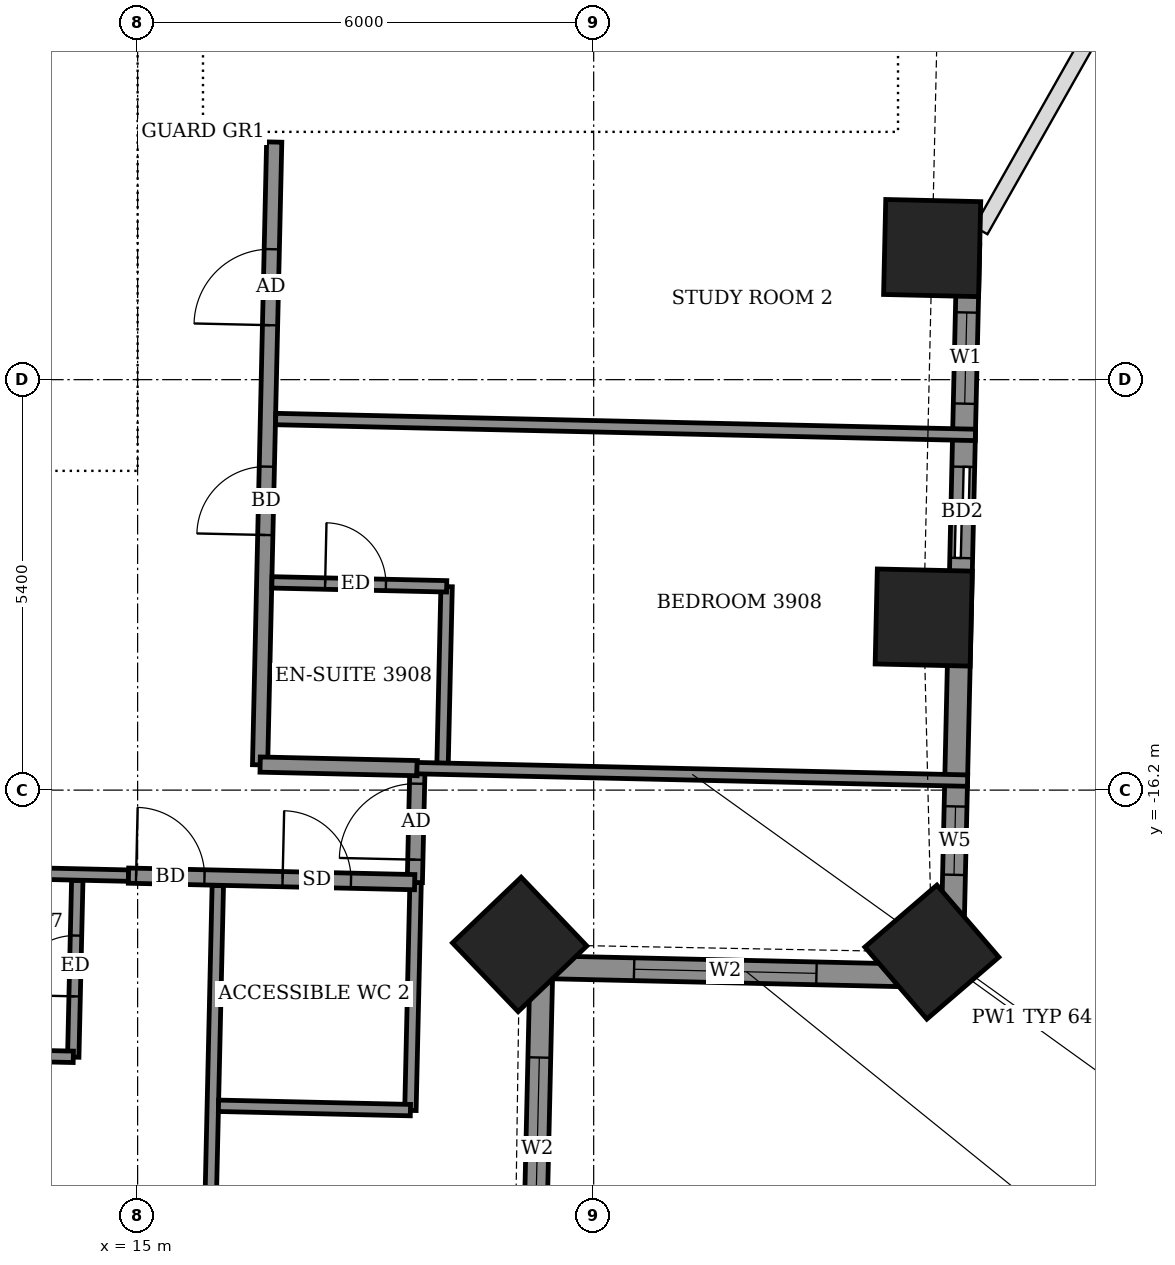
"""IFC4 building model, lengths in metres.
Left out: names, types, materials, properties, quantities, classifications, styles, units other than length and angle.
Written with IfcOpenShell. Run it as: python <this file> out.ifc"""

import sys

from ifc_helpers import new_model, si_unit, direction, frame, frame_2d, origin, origin_2d, place, context, subcontext, project, spatial, rectangle, extrude, element, fill, save


model = new_model("IFC4")
c1 = context("Model", 3, precision=1e-05, world=origin(), true_north=direction((0.0, 1.0)))
c2 = subcontext(c1, "Body", "Model", "MODEL_VIEW")
j1 = project(units=[si_unit("LENGTHUNIT", "METRE"), si_unit("PLANEANGLEUNIT", "RADIAN")], contexts=[c1])
p1 = place(None, origin())
s1 = spatial("IfcSite", under=j1, at=p1, CompositionType="ELEMENT")
p2 = place(p1, origin())
s2 = spatial("IfcBuilding", under=s1, at=p2, CompositionType="ELEMENT")
p3 = place(p2, frame((0.0, 0.0, 156.3)))
s3 = spatial("IfcBuildingStorey", under=s2, at=p3, CompositionType="ELEMENT", Elevation=156.3)
for number, where, z_axis, x_axis in (
    (1, (20.026, -18.23, -0.55), (0.0, 0.0, 1.0), (0.723, 0.691, 0.0)),
    (2, (25.449, -18.331, -0.55), (0.0, 0.0, 1.0), (0.758, 0.652, 0.0)),
    (3, (25.342, -13.93, -0.55), (0.0, 0.0, 1.0), (0.023, 1.0, 0.0)),
    (4, (25.453, -9.069, -0.55), (0.0, 0.0, 1.0), (0.023, 1.0, 0.0)),
):
    element("IfcColumn", number, at=place(p3, frame(where, z_axis=z_axis, x_axis=x_axis)), inside=s3, PredefinedType="COLUMN", context=c2, shape_type="SweptSolid", body=[
        extrude(rectangle(XDim=1.25, YDim=1.25, at=origin_2d()), origin(), (0.0, 0.0, 1.0), 3.6),
    ])
p4 = place(p3, frame((25.71, -18.651, 0.0), z_axis=(0.0, 0.0, 1.0), x_axis=(0.02274444447, 0.999741311663, 0.0)))
e5 = element("IfcWall", 5, at=p4, inside=s3, PredefinedType="SOLIDWALL", context=c2, shape_type="SweptSolid", body=[
    extrude(rectangle(XDim=9.628, YDim=0.3, at=frame_2d((4.814, 0.0))), origin(), (0.0, 0.0, 1.0), 2.55),
])
p5 = place(p4, frame((1.337, 0.0, 0.9)))
e6 = element("IfcOpeningElement", 6, at=p5, cuts=e5, PredefinedType="OPENING", context=c2, shape_type="SweptSolid", body=[
    extrude(rectangle(XDim=0.9, YDim=1.5, at=frame_2d((0.45, 0.75))), frame((0.0, 0.16, 0.0), z_axis=(0.0, -1.0, 0.0), x_axis=(1.0, 0.0, 0.0)), (0.0, 0.0, 1.0), 0.32),
])
p6 = place(p4, frame((5.506, 0.0, 0.0)))
e7 = element("IfcOpeningElement", 7, at=p6, cuts=e5, PredefinedType="OPENING", context=c2, shape_type="SweptSolid", body=[
    extrude(rectangle(XDim=1.2, YDim=2.4, at=frame_2d((0.6, 1.2))), frame((0.0, 0.16, 0.0), z_axis=(0.0, -1.0, 0.0), x_axis=(1.0, 0.0, 0.0)), (0.0, 0.0, 1.0), 0.32),
])
p7 = place(p4, frame((7.537, 0.0, 0.9)))
e8 = element("IfcOpeningElement", 8, at=p7, cuts=e5, PredefinedType="OPENING", context=c2, shape_type="SweptSolid", body=[
    extrude(rectangle(XDim=1.2, YDim=1.5, at=frame_2d((0.6, 0.75))), frame((0.0, 0.16, 0.0), z_axis=(0.0, -1.0, 0.0), x_axis=(1.0, 0.0, 0.0)), (0.0, 0.0, 1.0), 0.32),
])
p8 = place(p3, frame((20.189, -23.927, 0.0), z_axis=(0.0, 0.0, 1.0), x_axis=(0.022789195272, 0.999740292565, 0.0)))
e9 = element("IfcWall", 9, at=p8, inside=s3, PredefinedType="SOLIDWALL", context=c2, shape_type="SweptSolid", body=[
    extrude(rectangle(XDim=5.399, YDim=0.3, at=frame_2d((2.7, 0.0))), origin(), (0.0, 0.0, 1.0), 2.55),
])
p9 = place(p8, frame((1.81, 0.0, 0.9)))
e10 = element("IfcOpeningElement", 10, at=p9, cuts=e9, PredefinedType="OPENING", context=c2, shape_type="SweptSolid", body=[
    extrude(rectangle(XDim=2.4, YDim=1.5, at=frame_2d((1.2, 0.75))), frame((0.0, 0.16, 0.0), z_axis=(0.0, -1.0, 0.0), x_axis=(1.0, 0.0, 0.0)), (0.0, 0.0, 1.0), 0.32),
])
p10 = place(p3, frame((20.312, -18.529, 0.0), z_axis=(0.0, 0.0, 1.0), x_axis=(0.999745417973, -0.02256322766, 0.0)))
e11 = element("IfcWall", 11, at=p10, inside=s3, PredefinedType="SOLIDWALL", context=c2, shape_type="SweptSolid", body=[
    extrude(rectangle(XDim=5.399, YDim=0.3, at=frame_2d((2.7, 0.0))), origin(), (0.0, 0.0, 1.0), 2.55),
])
p11 = place(p10, frame((1.22, 0.0, 0.9)))
e12 = element("IfcOpeningElement", 12, at=p11, cuts=e11, PredefinedType="OPENING", context=c2, shape_type="SweptSolid", body=[
    extrude(rectangle(XDim=2.4, YDim=1.5, at=frame_2d((1.2, 0.75))), frame((0.0, 0.16, 0.0), z_axis=(0.0, -1.0, 0.0), x_axis=(1.0, 0.0, 0.0)), (0.0, 0.0, 1.0), 0.32),
])
p12 = place(p3, frame((15.907, -23.98, 0.0), z_axis=(0.0, 0.0, 1.0), x_axis=(0.022672114006, 0.999742954587, 0.0)))
e13 = element("IfcWall", 13, at=p12, inside=s3, PredefinedType="PARTITIONING", context=c2, shape_type="SweptSolid", body=[
    extrude(rectangle(XDim=6.526, YDim=0.15, at=frame_2d((3.263, 0.0))), origin(), (0.0, 0.0, 1.0), 2.55),
])
p13 = place(p3, frame((18.589, -20.414, 0.0), z_axis=(0.0, 0.0, 1.0), x_axis=(0.022625271604, 0.999744015778, 0.0)))
e14 = element("IfcWall", 14, at=p13, inside=s3, PredefinedType="PARTITIONING", context=c2, shape_type="SweptSolid", body=[
    extrude(rectangle(XDim=3.0, YDim=0.15, at=frame_2d((1.5, 0.0))), origin(), (0.0, 0.0, 1.0), 3.05),
])
p14 = place(p3, frame((16.064, -20.353, 0.0), z_axis=(0.0, 0.0, 1.0), x_axis=(0.999746356616, -0.022521599255, 0.0)))
e15 = element("IfcWall", 15, at=p14, inside=s3, PredefinedType="PARTITIONING", context=c2, shape_type="SweptSolid", body=[
    extrude(rectangle(XDim=2.526, YDim=0.15, at=frame_2d((1.263, 0.0))), origin(), (0.0, 0.0, 1.0), 3.05),
])
p15 = place(p3, frame((14.153, -19.713, 0.0), z_axis=(0.0, 0.0, 1.0), x_axis=(0.02279059109, 0.999740260747, 0.0)))
e16 = element("IfcWall", 16, at=p15, inside=s3, PredefinedType="PARTITIONING", context=c2, shape_type="SweptSolid", body=[
    extrude(rectangle(XDim=2.324, YDim=0.15, at=frame_2d((1.162, 0.0))), origin(), (0.0, 0.0, 1.0), 3.05),
])
p16 = place(p15, frame((0.8, 0.0, 0.0)))
e17 = element("IfcOpeningElement", 17, at=p16, cuts=e16, PredefinedType="OPENING", context=c2, shape_type="SweptSolid", body=[
    extrude(rectangle(XDim=0.8, YDim=2.1, at=frame_2d((0.4, 1.05))), frame((0.0, 0.085, 0.0), z_axis=(0.0, -1.0, 0.0), x_axis=(1.0, 0.0, 0.0)), (0.0, 0.0, 1.0), 0.17),
])
p17 = place(p3, frame((9.355, -19.601, 0.0), z_axis=(0.0, 0.0, 1.0), x_axis=(0.999747294078, -0.022479946278, 0.0)))
e18 = element("IfcWall", 18, at=p17, inside=s3, PredefinedType="PARTITIONING", context=c2, shape_type="SweptSolid", body=[
    extrude(rectangle(XDim=4.8, YDim=0.15, at=frame_2d((2.4, 0.0))), origin(), (0.0, 0.0, 1.0), 3.05),
])
p18 = place(p3, frame((18.647, -17.415, 0.0), z_axis=(0.0, 0.0, 1.0), x_axis=(0.022617910375, 0.999744182344, 0.0)))
e19 = element("IfcWall", 19, at=p18, inside=s3, PredefinedType="PARTITIONING", context=c2, shape_type="SweptSolid", body=[
    extrude(rectangle(XDim=1.5, YDim=0.2, at=frame_2d((0.75, 0.0))), origin(), (0.0, 0.0, 1.0), 3.05),
])
p19 = place(p18, frame((0.3, 0.0, 0.0)))
e20 = element("IfcOpeningElement", 20, at=p19, cuts=e19, PredefinedType="OPENING", context=c2, shape_type="SweptSolid", body=[
    extrude(rectangle(XDim=1.0, YDim=2.1, at=frame_2d((0.5, 1.05))), frame((0.0, 0.11, 0.0), z_axis=(0.0, -1.0, 0.0), x_axis=(1.0, 0.0, 0.0)), (0.0, 0.0, 1.0), 0.22),
])
p20 = place(p3, frame((-15.649, -16.633, 0.0), z_axis=(0.0, 0.0, 1.0), x_axis=(0.999743261737, -0.022658565952, 0.0)))
e21 = element("IfcWall", 21, at=p20, inside=s3, PredefinedType="PARTITIONING", context=c2, shape_type="SweptSolid", body=[
    extrude(rectangle(XDim=30.536, YDim=0.15, at=frame_2d((15.268, 0.0))), origin(), (0.0, 0.0, 1.0), 3.05),
])
p21 = place(p20, frame((0.2, 0.0, 0.0)))
e22 = element("IfcOpeningElement", 22, at=p21, cuts=e21, PredefinedType="OPENING", context=c2, shape_type="SweptSolid", body=[
    extrude(rectangle(XDim=0.9, YDim=2.1, at=frame_2d((0.45, 1.05))), frame((0.0, 0.085, 0.0), z_axis=(0.0, -1.0, 0.0), x_axis=(1.0, 0.0, 0.0)), (0.0, 0.0, 1.0), 0.17),
])
p22 = place(p20, frame((4.465, 0.0, 0.0)))
e23 = element("IfcOpeningElement", 23, at=p22, cuts=e21, PredefinedType="OPENING", context=c2, shape_type="SweptSolid", body=[
    extrude(rectangle(XDim=0.9, YDim=2.1, at=frame_2d((0.45, 1.05))), frame((0.0, 0.085, 0.0), z_axis=(0.0, -1.0, 0.0), x_axis=(1.0, 0.0, 0.0)), (0.0, 0.0, 1.0), 0.17),
])
p23 = place(p20, frame((6.315, 0.0, 0.0)))
e24 = element("IfcOpeningElement", 24, at=p23, cuts=e21, PredefinedType="OPENING", context=c2, shape_type="SweptSolid", body=[
    extrude(rectangle(XDim=0.9, YDim=2.1, at=frame_2d((0.45, 1.05))), frame((0.0, 0.085, 0.0), z_axis=(0.0, -1.0, 0.0), x_axis=(1.0, 0.0, 0.0)), (0.0, 0.0, 1.0), 0.17),
])
p24 = place(p20, frame((13.04, 0.0, 0.0)))
e25 = element("IfcOpeningElement", 25, at=p24, cuts=e21, PredefinedType="OPENING", context=c2, shape_type="SweptSolid", body=[
    extrude(rectangle(XDim=0.9, YDim=2.1, at=frame_2d((0.45, 1.05))), frame((0.0, 0.085, 0.0), z_axis=(0.0, -1.0, 0.0), x_axis=(1.0, 0.0, 0.0)), (0.0, 0.0, 1.0), 0.17),
])
p25 = place(p20, frame((15.015, 0.0, 0.0)))
e26 = element("IfcOpeningElement", 26, at=p25, cuts=e21, PredefinedType="OPENING", context=c2, shape_type="SweptSolid", body=[
    extrude(rectangle(XDim=0.9, YDim=2.1, at=frame_2d((0.45, 1.05))), frame((0.0, 0.085, 0.0), z_axis=(0.0, -1.0, 0.0), x_axis=(1.0, 0.0, 0.0)), (0.0, 0.0, 1.0), 0.17),
])
p26 = place(p20, frame((21.74, 0.0, 0.0)))
e27 = element("IfcOpeningElement", 27, at=p26, cuts=e21, PredefinedType="OPENING", context=c2, shape_type="SweptSolid", body=[
    extrude(rectangle(XDim=0.9, YDim=2.1, at=frame_2d((0.45, 1.05))), frame((0.0, 0.085, 0.0), z_axis=(0.0, -1.0, 0.0), x_axis=(1.0, 0.0, 0.0)), (0.0, 0.0, 1.0), 0.17),
])
p27 = place(p20, frame((23.665, 0.0, 0.0)))
e28 = element("IfcOpeningElement", 28, at=p27, cuts=e21, PredefinedType="OPENING", context=c2, shape_type="SweptSolid", body=[
    extrude(rectangle(XDim=0.9, YDim=2.1, at=frame_2d((0.45, 1.05))), frame((0.0, 0.085, 0.0), z_axis=(0.0, -1.0, 0.0), x_axis=(1.0, 0.0, 0.0)), (0.0, 0.0, 1.0), 0.17),
])
p28 = place(p3, frame((14.88, -17.325, 0.0), z_axis=(0.0, 0.0, 1.0), x_axis=(0.999739622, -0.022818593369, 0.0)))
e29 = element("IfcWall", 29, at=p28, inside=s3, PredefinedType="PARTITIONING", context=c2, shape_type="SweptSolid", body=[
    extrude(rectangle(XDim=3.766, YDim=0.2, at=frame_2d((1.883, 0.0))), origin(), (0.0, 0.0, 1.0), 3.05),
])
p29 = place(p28, frame((0.1, 0.0, 0.0)))
e30 = element("IfcOpeningElement", 30, at=p29, cuts=e29, PredefinedType="OPENING", context=c2, shape_type="SweptSolid", body=[
    extrude(rectangle(XDim=0.9, YDim=2.1, at=frame_2d((0.45, 1.05))), frame((0.0, 0.11, 0.0), z_axis=(0.0, -1.0, 0.0), x_axis=(1.0, 0.0, 0.0)), (0.0, 0.0, 1.0), 0.22),
])
p30 = place(p28, frame((2.028, 0.0, 0.0)))
e31 = element("IfcOpeningElement", 31, at=p30, cuts=e29, PredefinedType="OPENING", context=c2, shape_type="SweptSolid", body=[
    extrude(rectangle(XDim=0.9, YDim=2.1, at=frame_2d((0.45, 1.05))), frame((0.0, 0.11, 0.0), z_axis=(0.0, -1.0, 0.0), x_axis=(1.0, 0.0, 0.0)), (0.0, 0.0, 1.0), 0.22),
])
p31 = place(p3, frame((16.611, -15.868, 0.0), z_axis=(0.0, 0.0, 1.0), x_axis=(0.022698399288, 0.999742358145, 0.0)))
e32 = element("IfcWall", 32, at=p31, inside=s3, PredefinedType="PARTITIONING", context=c2, shape_type="SweptSolid", body=[
    extrude(rectangle(XDim=8.196, YDim=0.2, at=frame_2d((4.098, 0.0))), origin(), (0.0, 0.0, 1.0), 3.05),
])
p32 = place(p31, frame((3.025, 0.0, 0.0)))
e33 = element("IfcOpeningElement", 33, at=p32, cuts=e32, PredefinedType="OPENING", context=c2, shape_type="SweptSolid", body=[
    extrude(rectangle(XDim=0.9, YDim=2.1, at=frame_2d((0.45, 1.05))), frame((0.0, 0.11, 0.0), z_axis=(0.0, -1.0, 0.0), x_axis=(1.0, 0.0, 0.0)), (0.0, 0.0, 1.0), 0.22),
])
p33 = place(p31, frame((5.786, 0.0, 0.0)))
e34 = element("IfcOpeningElement", 34, at=p33, cuts=e32, PredefinedType="OPENING", context=c2, shape_type="SweptSolid", body=[
    extrude(rectangle(XDim=1.0, YDim=2.1, at=frame_2d((0.5, 1.05))), frame((0.0, 0.11, 0.0), z_axis=(0.0, -1.0, 0.0), x_axis=(1.0, 0.0, 0.0)), (0.0, 0.0, 1.0), 0.22),
])
p34 = place(p3, frame((19.012, -15.848, 0.0), z_axis=(0.0, 0.0, 1.0), x_axis=(0.022781023197, 0.999740478815, 0.0)))
e35 = element("IfcWall", 35, at=p34, inside=s3, PredefinedType="PARTITIONING", context=c2, shape_type="SweptSolid", body=[
    extrude(rectangle(XDim=2.325, YDim=0.15, at=frame_2d((1.163, 0.0))), origin(), (0.0, 0.0, 1.0), 3.05),
])
p35 = place(p3, frame((16.612, -15.864, 0.0), z_axis=(0.0, 0.0, 1.0), x_axis=(0.999742931749, -0.02267312106, 0.0)))
e36 = element("IfcWall", 36, at=p35, inside=s3, PredefinedType="PARTITIONING", context=c2, shape_type="SweptSolid", body=[
    extrude(rectangle(XDim=2.067, YDim=0.2, at=frame_2d((1.034, 0.0))), origin(), (0.0, 0.0, 1.0), 3.05),
])
p36 = place(p3, frame((18.675, -15.911, 0.0), z_axis=(0.0, 0.0, 1.0), x_axis=(0.999743624132, -0.022642570706, 0.0)))
e37 = element("IfcWall", 37, at=p36, inside=s3, PredefinedType="PARTITIONING", context=c2, shape_type="SweptSolid", body=[
    extrude(rectangle(XDim=7.246, YDim=0.15, at=frame_2d((3.623, 0.0))), origin(), (0.0, 0.0, 1.0), 2.55),
])
p37 = place(p3, frame((16.767, -13.467, 0.0), z_axis=(0.0, 0.0, 1.0), x_axis=(0.999744241736, -0.022615284993, 0.0)))
e38 = element("IfcWall", 38, at=p37, inside=s3, PredefinedType="PARTITIONING", context=c2, shape_type="SweptSolid", body=[
    extrude(rectangle(XDim=2.299, YDim=0.15, at=frame_2d((1.15, 0.0))), origin(), (0.0, 0.0, 1.0), 3.05),
])
p38 = place(p37, frame((0.7, 0.0, 0.0)))
e39 = element("IfcOpeningElement", 39, at=p38, cuts=e38, PredefinedType="OPENING", context=c2, shape_type="SweptSolid", body=[
    extrude(rectangle(XDim=0.8, YDim=2.1, at=frame_2d((0.4, 1.05))), frame((0.0, 0.085, 0.0), z_axis=(0.0, -1.0, 0.0), x_axis=(1.0, 0.0, 0.0)), (0.0, 0.0, 1.0), 0.17),
])
p39 = place(p3, frame((16.816, -11.318, 0.0), z_axis=(0.0, 0.0, 1.0), x_axis=(0.999742437445, -0.022694906292, 0.0)))
e40 = element("IfcWall", 40, at=p39, inside=s3, PredefinedType="PARTITIONING", context=c2, shape_type="SweptSolid", body=[
    extrude(rectangle(XDim=9.208, YDim=0.15, at=frame_2d((4.604, 0.0))), origin(), (0.0, 0.0, 1.0), 2.55),
])
p40 = place(p3, frame((-14.7, -11.25, 0.0), z_axis=(0.0, 0.0, 1.0), x_axis=(1.0, 0.0, 0.0)))
e41 = element("IfcWall", 41, at=p40, inside=s3, PredefinedType="SHEAR", context=c2, shape_type="SweptSolid", body=[
    extrude(rectangle(XDim=29.4, YDim=0.9, at=frame_2d((14.7, 0.0))), origin(), (0.0, 0.0, 1.0), 3.6),
])
p41 = place(p3, frame((14.25, -10.8, 0.0), z_axis=(0.0, 0.0, 1.0), x_axis=(0.0, 1.0, 0.0)))
e42 = element("IfcWall", 42, at=p41, inside=s3, PredefinedType="SHEAR", context=c2, shape_type="SweptSolid", body=[
    extrude(rectangle(XDim=21.6, YDim=0.9, at=frame_2d((10.8, 0.0))), origin(), (0.0, 0.0, 1.0), 3.6),
])
p42 = place(p41, frame((1.2, 0.0, 0.0)))
e43 = element("IfcOpeningElement", 43, at=p42, cuts=e42, PredefinedType="OPENING", context=c2, shape_type="SweptSolid", body=[
    extrude(rectangle(XDim=1.2, YDim=2.1, at=frame_2d((0.6, 1.05))), frame((0.0, 0.46, 0.0), z_axis=(0.0, -1.0, 0.0), x_axis=(1.0, 0.0, 0.0)), (0.0, 0.0, 1.0), 0.92),
])
p43 = place(p5, origin())
e44 = element("IfcWindow", 44, at=p43, inside=s3, PartitioningType="SINGLE_PANEL", PredefinedType="WINDOW", context=c2, shape_type="SweptSolid", body=[
    extrude(rectangle(XDim=0.9, YDim=1.5, at=frame_2d((0.45, 0.75))), frame((0.0, 0.03, 0.0), z_axis=(0.0, -1.0, 0.0), x_axis=(1.0, 0.0, 0.0)), (0.0, 0.0, 1.0), 0.06),
])
fill(e6, e44)
p44 = place(p6, origin())
e45 = element("IfcDoor", 45, at=p44, inside=s3, OperationType="SLIDING_TO_LEFT", PredefinedType="DOOR", context=c2, shape_type="SweptSolid", body=[
    extrude(rectangle(XDim=1.2, YDim=2.4, at=frame_2d((0.6, 1.2))), frame((0.0, 0.025, 0.0), z_axis=(0.0, -1.0, 0.0), x_axis=(1.0, 0.0, 0.0)), (0.0, 0.0, 1.0), 0.05),
])
fill(e7, e45)
p45 = place(p7, origin())
e46 = element("IfcWindow", 46, at=p45, inside=s3, PartitioningType="SINGLE_PANEL", PredefinedType="WINDOW", context=c2, shape_type="SweptSolid", body=[
    extrude(rectangle(XDim=1.2, YDim=1.5, at=frame_2d((0.6, 0.75))), frame((0.0, 0.03, 0.0), z_axis=(0.0, -1.0, 0.0), x_axis=(1.0, 0.0, 0.0)), (0.0, 0.0, 1.0), 0.06),
])
fill(e8, e46)
p46 = place(p9, origin())
e47 = element("IfcWindow", 47, at=p46, inside=s3, PartitioningType="DOUBLE_PANEL_VERTICAL", PredefinedType="WINDOW", context=c2, shape_type="SweptSolid", body=[
    extrude(rectangle(XDim=2.4, YDim=1.5, at=frame_2d((1.2, 0.75))), frame((0.0, 0.03, 0.0), z_axis=(0.0, -1.0, 0.0), x_axis=(1.0, 0.0, 0.0)), (0.0, 0.0, 1.0), 0.06),
])
fill(e10, e47)
p47 = place(p11, origin())
e48 = element("IfcWindow", 48, at=p47, inside=s3, PartitioningType="DOUBLE_PANEL_VERTICAL", PredefinedType="WINDOW", context=c2, shape_type="SweptSolid", body=[
    extrude(rectangle(XDim=2.4, YDim=1.5, at=frame_2d((1.2, 0.75))), frame((0.0, 0.03, 0.0), z_axis=(0.0, -1.0, 0.0), x_axis=(1.0, 0.0, 0.0)), (0.0, 0.0, 1.0), 0.06),
])
fill(e12, e48)
p48 = place(p29, origin())
e49 = element("IfcDoor", 49, at=p48, inside=s3, OperationType="SINGLE_SWING_LEFT", PredefinedType="DOOR", context=c2, shape_type="SweptSolid", body=[
    extrude(rectangle(XDim=0.9, YDim=2.1, at=frame_2d((0.45, 1.05))), frame((0.0, 0.025, 0.0), z_axis=(0.0, -1.0, 0.0), x_axis=(1.0, 0.0, 0.0)), (0.0, 0.0, 1.0), 0.05),
])
fill(e30, e49)
p49 = place(p16, origin())
e50 = element("IfcDoor", 50, at=p49, inside=s3, OperationType="SINGLE_SWING_LEFT", PredefinedType="DOOR", context=c2, shape_type="SweptSolid", body=[
    extrude(rectangle(XDim=0.8, YDim=2.1, at=frame_2d((0.4, 1.05))), frame((0.0, 0.025, 0.0), z_axis=(0.0, -1.0, 0.0), x_axis=(1.0, 0.0, 0.0)), (0.0, 0.0, 1.0), 0.05),
])
fill(e17, e50)
p50 = place(p19, origin())
e51 = element("IfcDoor", 51, at=p50, inside=s3, OperationType="SINGLE_SWING_RIGHT", PredefinedType="DOOR", context=c2, shape_type="SweptSolid", body=[
    extrude(rectangle(XDim=1.0, YDim=2.1, at=frame_2d((0.5, 1.05))), frame((0.0, 0.025, 0.0), z_axis=(0.0, -1.0, 0.0), x_axis=(1.0, 0.0, 0.0)), (0.0, 0.0, 1.0), 0.05),
])
fill(e20, e51)
p51 = place(p30, origin())
e52 = element("IfcDoor", 52, at=p51, inside=s3, OperationType="SINGLE_SWING_RIGHT", PredefinedType="DOOR", context=c2, shape_type="SweptSolid", body=[
    extrude(rectangle(XDim=0.9, YDim=2.1, at=frame_2d((0.45, 1.05))), frame((0.0, 0.025, 0.0), z_axis=(0.0, -1.0, 0.0), x_axis=(1.0, 0.0, 0.0)), (0.0, 0.0, 1.0), 0.05),
])
fill(e31, e52)
p52 = place(p32, origin())
e53 = element("IfcDoor", 53, at=p52, inside=s3, OperationType="SINGLE_SWING_RIGHT", PredefinedType="DOOR", context=c2, shape_type="SweptSolid", body=[
    extrude(rectangle(XDim=0.9, YDim=2.1, at=frame_2d((0.45, 1.05))), frame((0.0, 0.025, 0.0), z_axis=(0.0, -1.0, 0.0), x_axis=(1.0, 0.0, 0.0)), (0.0, 0.0, 1.0), 0.05),
])
fill(e33, e53)
p53 = place(p38, origin())
e54 = element("IfcDoor", 54, at=p53, inside=s3, OperationType="SINGLE_SWING_RIGHT", PredefinedType="DOOR", context=c2, shape_type="SweptSolid", body=[
    extrude(rectangle(XDim=0.8, YDim=2.1, at=frame_2d((0.4, 1.05))), frame((0.0, 0.025, 0.0), z_axis=(0.0, -1.0, 0.0), x_axis=(1.0, 0.0, 0.0)), (0.0, 0.0, 1.0), 0.05),
])
fill(e39, e54)
p54 = place(p33, origin())
e55 = element("IfcDoor", 55, at=p54, inside=s3, OperationType="SINGLE_SWING_LEFT", PredefinedType="DOOR", context=c2, shape_type="SweptSolid", body=[
    extrude(rectangle(XDim=1.0, YDim=2.1, at=frame_2d((0.5, 1.05))), frame((0.0, 0.025, 0.0), z_axis=(0.0, -1.0, 0.0), x_axis=(1.0, 0.0, 0.0)), (0.0, 0.0, 1.0), 0.05),
])
fill(e34, e55)
p55 = place(p42, origin())
e56 = element("IfcDoor", 56, at=p55, inside=s3, OperationType="DOUBLE_DOOR_SINGLE_SWING", PredefinedType="DOOR", context=c2, shape_type="SweptSolid", body=[
    extrude(rectangle(XDim=1.2, YDim=2.1, at=frame_2d((0.6, 1.05))), frame((0.0, 0.025, 0.0), z_axis=(0.0, -1.0, 0.0), x_axis=(1.0, 0.0, 0.0)), (0.0, 0.0, 1.0), 0.05),
])
fill(e43, e56)
save(model, sys.argv[1])
